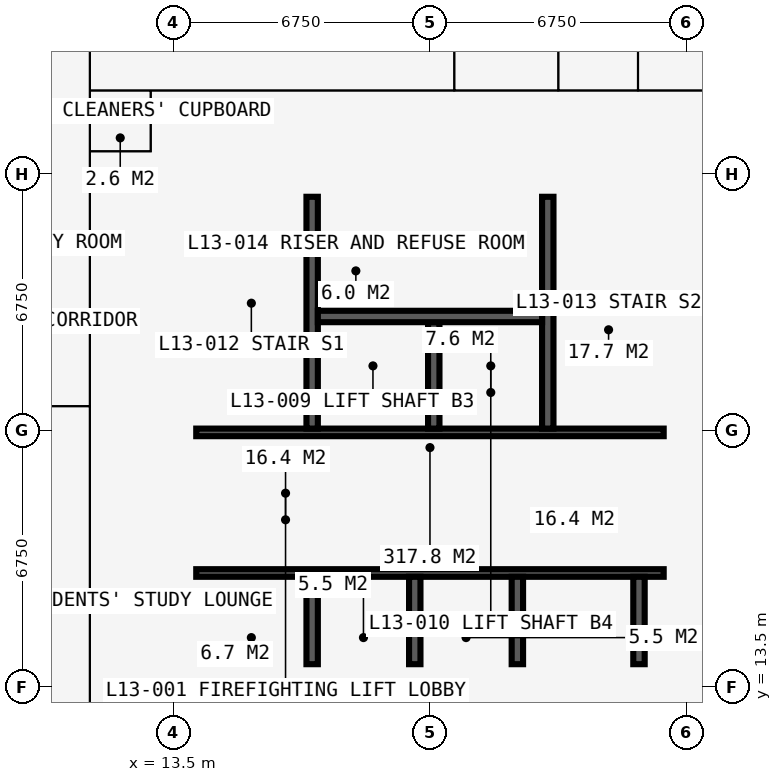
"""IFC4 building model, lengths in metres.
Left out: names, types, materials, properties, quantities, classifications, styles, units other than length and angle.
Written with IfcOpenShell. Run it as: python <this file> out.ifc"""

import sys

from ifc_helpers import new_model, si_unit, direction, frame, frame_2d, origin, place, context, subcontext, project, spatial, rectangle, extrude, element, fill, save


model = new_model("IFC4")
c1 = context("Model", 3, precision=1e-05, world=origin(), true_north=direction((0.0, 1.0)))
c2 = subcontext(c1, "Body", "Model", "MODEL_VIEW")
j1 = project(units=[si_unit("LENGTHUNIT", "METRE"), si_unit("PLANEANGLEUNIT", "RADIAN")], contexts=[c1])
p1 = place(None, origin())
s1 = spatial("IfcSite", under=j1, at=p1, CompositionType="ELEMENT")
p2 = place(p1, origin())
s2 = spatial("IfcBuilding", under=s1, at=p2, CompositionType="ELEMENT")
p3 = place(p2, frame((0.0, 0.0, 50.4)))
s3 = spatial("IfcBuildingStorey", under=s2, at=p3, CompositionType="ELEMENT", Elevation=50.4)
p4 = place(p3, frame((12.9, 13.5, 0.0), z_axis=(0.0, 0.0, 1.0), x_axis=(1.0, 0.0, 0.0)))
e1 = element("IfcWall", 1, at=p4, inside=s3, PredefinedType="SHEAR", context=c2, shape_type="SweptSolid", body=[
    extrude(rectangle(XDim=14.7, YDim=1.2, at=frame_2d((7.35, 0.0))), origin(), (0.0, 0.0, 1.0), 3.6),
])
p5 = place(p3, frame((27.0, 14.1, 0.0), z_axis=(0.0, 0.0, 1.0), x_axis=(0.0, 1.0, 0.0)))
e2 = element("IfcWall", 2, at=p5, inside=s3, PredefinedType="SHEAR", context=c2, shape_type="SweptSolid", body=[
    extrude(rectangle(XDim=12.3, YDim=1.2, at=frame_2d((6.15, 0.0))), origin(), (0.0, 0.0, 1.0), 3.6),
])
p6 = place(p5, frame((3.65, 0.0, 0.0)))
e3 = element("IfcOpeningElement", 3, at=p6, cuts=e2, PredefinedType="OPENING", context=c2, shape_type="SweptSolid", body=[
    extrude(rectangle(XDim=1.2, YDim=2.2, at=frame_2d((0.6, 1.1))), frame((0.0, 0.61, 0.0), z_axis=(0.0, -1.0, 0.0), x_axis=(1.0, 0.0, 0.0)), (0.0, 0.0, 1.0), 1.22),
])
p7 = place(p3, frame((27.6, 27.0, 0.0), z_axis=(0.0, 0.0, 1.0), x_axis=(-1.0, 0.0, 0.0)))
e4 = element("IfcWall", 4, at=p7, inside=s3, PredefinedType="SHEAR", context=c2, shape_type="SweptSolid", body=[
    extrude(rectangle(XDim=14.7, YDim=1.2, at=frame_2d((7.35, 0.0))), origin(), (0.0, 0.0, 1.0), 3.6),
])
p8 = place(p7, frame((5.225, 0.0, 0.0)))
e5 = element("IfcOpeningElement", 5, at=p8, cuts=e4, PredefinedType="OPENING", context=c2, shape_type="SweptSolid", body=[
    extrude(rectangle(XDim=0.9, YDim=2.2, at=frame_2d((0.45, 1.1))), frame((0.0, 0.61, 0.0), z_axis=(0.0, -1.0, 0.0), x_axis=(1.0, 0.0, 0.0)), (0.0, 0.0, 1.0), 1.22),
])
p9 = place(p7, frame((8.2, 0.0, 0.0)))
e6 = element("IfcOpeningElement", 6, at=p9, cuts=e4, PredefinedType="OPENING", context=c2, shape_type="SweptSolid", body=[
    extrude(rectangle(XDim=1.0, YDim=2.2, at=frame_2d((0.5, 1.1))), frame((0.0, 0.61, 0.0), z_axis=(0.0, -1.0, 0.0), x_axis=(1.0, 0.0, 0.0)), (0.0, 0.0, 1.0), 1.22),
])
p10 = place(p3, frame((13.5, 26.4, 0.0), z_axis=(0.0, 0.0, 1.0), x_axis=(0.0, -1.0, 0.0)))
e7 = element("IfcWall", 7, at=p10, inside=s3, PredefinedType="SHEAR", context=c2, shape_type="SweptSolid", body=[
    extrude(rectangle(XDim=12.3, YDim=1.2, at=frame_2d((6.15, 0.0))), origin(), (0.0, 0.0, 1.0), 3.6),
])
p11 = place(p10, frame((7.45, 0.0, 0.0)))
e8 = element("IfcOpeningElement", 8, at=p11, cuts=e7, PredefinedType="OPENING", context=c2, shape_type="SweptSolid", body=[
    extrude(rectangle(XDim=1.2, YDim=2.2, at=frame_2d((0.6, 1.1))), frame((0.0, 0.61, 0.0), z_axis=(0.0, -1.0, 0.0), x_axis=(1.0, 0.0, 0.0)), (0.0, 0.0, 1.0), 1.22),
])
p12 = place(p3, frame((14.1, 16.5, 0.0), z_axis=(0.0, 0.0, 1.0), x_axis=(1.0, 0.0, 0.0)))
e9 = element("IfcWall", 9, at=p12, inside=s3, PredefinedType="SHEAR", context=c2, shape_type="SweptSolid", body=[
    extrude(rectangle(XDim=12.3, YDim=0.2, at=frame_2d((6.15, 0.0))), origin(), (0.0, 0.0, 1.0), 3.6),
])
p13 = place(p12, frame((0.9, 0.0, 0.0)))
e10 = element("IfcOpeningElement", 10, at=p13, cuts=e9, PredefinedType="OPENING", context=c2, shape_type="SweptSolid", body=[
    extrude(rectangle(XDim=1.1, YDim=2.2, at=frame_2d((0.55, 1.1))), frame((0.0, 0.11, 0.0), z_axis=(0.0, -1.0, 0.0), x_axis=(1.0, 0.0, 0.0)), (0.0, 0.0, 1.0), 0.22),
])
p14 = place(p12, frame((9.5, 0.0, 0.0)))
e11 = element("IfcOpeningElement", 11, at=p14, cuts=e9, PredefinedType="OPENING", context=c2, shape_type="SweptSolid", body=[
    extrude(rectangle(XDim=1.1, YDim=2.2, at=frame_2d((0.55, 1.1))), frame((0.0, 0.11, 0.0), z_axis=(0.0, -1.0, 0.0), x_axis=(1.0, 0.0, 0.0)), (0.0, 0.0, 1.0), 0.22),
])
p15 = place(p3, frame((14.1, 20.2, 0.0), z_axis=(0.0, 0.0, 1.0), x_axis=(1.0, 0.0, 0.0)))
e12 = element("IfcWall", 12, at=p15, inside=s3, PredefinedType="SHEAR", context=c2, shape_type="SweptSolid", body=[
    extrude(rectangle(XDim=12.3, YDim=0.2, at=frame_2d((6.15, 0.0))), origin(), (0.0, 0.0, 1.0), 3.6),
])
p16 = place(p15, frame((0.35, 0.0, 0.0)))
e13 = element("IfcOpeningElement", 13, at=p16, cuts=e12, PredefinedType="OPENING", context=c2, shape_type="SweptSolid", body=[
    extrude(rectangle(XDim=1.1, YDim=2.2, at=frame_2d((0.55, 1.1))), frame((0.0, 0.11, 0.0), z_axis=(0.0, -1.0, 0.0), x_axis=(1.0, 0.0, 0.0)), (0.0, 0.0, 1.0), 0.22),
])
p17 = place(p15, frame((9.75, 0.0, 0.0)))
e14 = element("IfcOpeningElement", 14, at=p17, cuts=e12, PredefinedType="OPENING", context=c2, shape_type="SweptSolid", body=[
    extrude(rectangle(XDim=1.1, YDim=2.2, at=frame_2d((0.55, 1.1))), frame((0.0, 0.11, 0.0), z_axis=(0.0, -1.0, 0.0), x_axis=(1.0, 0.0, 0.0)), (0.0, 0.0, 1.0), 0.22),
])
for number, where, z_axis, x_axis in (
    (15, (17.15, 20.3, 0.0), (0.0, 0.0, 1.0), (0.0, 1.0, 0.0)),
    (16, (23.35, 20.3, 0.0), (0.0, 0.0, 1.0), (0.0, 1.0, 0.0)),
):
    element("IfcWall", number, at=place(p3, frame(where, z_axis=z_axis, x_axis=x_axis)), inside=s3, PredefinedType="SHEAR", context=c2, shape_type="SweptSolid", body=[
        extrude(rectangle(XDim=6.1, YDim=0.3, at=frame_2d((3.05, 0.0))), origin(), (0.0, 0.0, 1.0), 3.6),
    ])
p18 = place(p3, frame((20.35, 20.3, 0.0), z_axis=(0.0, 0.0, 1.0), x_axis=(0.0, 1.0, 0.0)))
e17 = element("IfcWall", 17, at=p18, inside=s3, PredefinedType="SHEAR", context=c2, shape_type="SweptSolid", body=[
    extrude(rectangle(XDim=2.8, YDim=0.3, at=frame_2d((1.4, 0.0))), origin(), (0.0, 0.0, 1.0), 3.6),
])
p19 = place(p3, frame((17.3, 23.25, 0.0), z_axis=(0.0, 0.0, 1.0), x_axis=(1.0, 0.0, 0.0)))
e18 = element("IfcWall", 18, at=p19, inside=s3, PredefinedType="SHEAR", context=c2, shape_type="SweptSolid", body=[
    extrude(rectangle(XDim=5.9, YDim=0.3, at=frame_2d((2.95, 0.0))), origin(), (0.0, 0.0, 1.0), 3.6),
])
for number, where, z_axis, x_axis in (
    (19, (17.15, 14.1, 0.0), (0.0, 0.0, 1.0), (0.0, 1.0, 0.0)),
    (20, (19.85, 14.1, 0.0), (0.0, 0.0, 1.0), (0.0, 1.0, 0.0)),
    (21, (22.55, 14.1, 0.0), (0.0, 0.0, 1.0), (0.0, 1.0, 0.0)),
    (22, (25.75, 14.1, 0.0), (0.0, 0.0, 1.0), (0.0, 1.0, 0.0)),
):
    element("IfcWall", number, at=place(p3, frame(where, z_axis=z_axis, x_axis=x_axis)), inside=s3, PredefinedType="SHEAR", context=c2, shape_type="SweptSolid", body=[
        extrude(rectangle(XDim=2.3, YDim=0.3, at=frame_2d((1.15, 0.0))), origin(), (0.0, 0.0, 1.0), 3.6),
    ])
p20 = place(p3, frame((18.875, 16.6, 0.0), z_axis=(0.0, 0.0, 1.0), x_axis=(0.0, 1.0, 0.0)))
e23 = element("IfcWall", 23, at=p20, inside=s3, PredefinedType="PARTITIONING", context=c2, shape_type="SweptSolid", body=[
    extrude(rectangle(XDim=3.5, YDim=0.15, at=frame_2d((1.75, 0.0))), origin(), (0.0, 0.0, 1.0), 3.375),
])
p21 = place(p20, frame((1.15, 0.0, 0.0)))
e24 = element("IfcOpeningElement", 24, at=p21, cuts=e23, PredefinedType="OPENING", context=c2, shape_type="SweptSolid", body=[
    extrude(rectangle(XDim=1.2, YDim=2.2, at=frame_2d((0.6, 1.1))), frame((0.0, 0.085, 0.0), z_axis=(0.0, -1.0, 0.0), x_axis=(1.0, 0.0, 0.0)), (0.0, 0.0, 1.0), 0.17),
])
p22 = place(p3, frame((21.625, 16.6, 0.0), z_axis=(0.0, 0.0, 1.0), x_axis=(0.0, 1.0, 0.0)))
e25 = element("IfcWall", 25, at=p22, inside=s3, PredefinedType="PARTITIONING", context=c2, shape_type="SweptSolid", body=[
    extrude(rectangle(XDim=3.5, YDim=0.15, at=frame_2d((1.75, 0.0))), origin(), (0.0, 0.0, 1.0), 3.375),
])
p23 = place(p22, frame((1.15, 0.0, 0.0)))
e26 = element("IfcOpeningElement", 26, at=p23, cuts=e25, PredefinedType="OPENING", context=c2, shape_type="SweptSolid", body=[
    extrude(rectangle(XDim=1.2, YDim=2.2, at=frame_2d((0.6, 1.1))), frame((0.0, 0.085, 0.0), z_axis=(0.0, -1.0, 0.0), x_axis=(1.0, 0.0, 0.0)), (0.0, 0.0, 1.0), 0.17),
])
p24 = place(p3, frame((20.38, 16.6, 0.0), z_axis=(0.0, 0.0, 1.0), x_axis=(0.0, 1.0, 0.0)))
e27 = element("IfcWall", 27, at=p24, inside=s3, PredefinedType="PARTITIONING", context=c2, shape_type="SweptSolid", body=[
    extrude(rectangle(XDim=3.5, YDim=0.15, at=frame_2d((1.75, 0.0))), origin(), (0.0, 0.0, 1.0), 3.375),
])
p25 = place(p3, frame((19.375, 23.4, 0.0), z_axis=(0.0, 0.0, 1.0), x_axis=(0.0, 1.0, 0.0)))
e28 = element("IfcWall", 28, at=p25, inside=s3, PredefinedType="PARTITIONING", context=c2, shape_type="SweptSolid", body=[
    extrude(rectangle(XDim=3.0, YDim=0.15, at=frame_2d((1.5, 0.0))), origin(), (0.0, 0.0, 1.0), 3.375),
])
for number, where, z_axis, x_axis in (
    (29, (5.65, 20.887, 0.0), (0.0, 0.0, 1.0), (1.0, 0.0, 0.0)),
    (30, (5.65, 22.988, 0.0), (0.0, 0.0, 1.0), (1.0, 0.0, 0.0)),
):
    element("IfcWall", number, at=place(p3, frame(where, z_axis=z_axis, x_axis=x_axis)), inside=s3, PredefinedType="PARTITIONING", context=c2, shape_type="SweptSolid", body=[
        extrude(rectangle(XDim=5.65, YDim=0.15, at=frame_2d((2.825, 0.0))), origin(), (0.0, 0.0, 1.0), 3.375),
    ])
p26 = place(p3, frame((11.3, 11.3, 0.0), z_axis=(0.0, 0.0, 1.0), x_axis=(0.0, 1.0, 0.0)))
e31 = element("IfcWall", 31, at=p26, inside=s3, PredefinedType="PARTITIONING", context=c2, shape_type="SweptSolid", body=[
    extrude(rectangle(XDim=19.075, YDim=0.15, at=frame_2d((9.538, 0.0))), origin(), (0.0, 0.0, 1.0), 3.375),
])
p27 = place(p26, frame((10.137, 0.0, 0.0)))
e32 = element("IfcOpeningElement", 32, at=p27, cuts=e31, PredefinedType="OPENING", context=c2, shape_type="SweptSolid", body=[
    extrude(rectangle(XDim=1.0, YDim=2.2, at=frame_2d((0.5, 1.1))), frame((0.0, 0.085, 0.0), z_axis=(0.0, -1.0, 0.0), x_axis=(1.0, 0.0, 0.0)), (0.0, 0.0, 1.0), 0.17),
])
p28 = place(p3, frame((11.3, 27.6, 0.0), z_axis=(0.0, 0.0, 1.0), x_axis=(1.0, 0.0, 0.0)))
e33 = element("IfcWall", 33, at=p28, inside=s3, PredefinedType="PARTITIONING", context=c2, shape_type="SweptSolid", body=[
    extrude(rectangle(XDim=1.6, YDim=0.15, at=frame_2d((0.8, 0.0))), origin(), (0.0, 0.0, 1.0), 2.877),
])
p29 = place(p28, frame((0.3, 0.0, 0.0)))
e34 = element("IfcOpeningElement", 34, at=p29, cuts=e33, PredefinedType="OPENING", context=c2, shape_type="SweptSolid", body=[
    extrude(rectangle(XDim=0.95, YDim=2.2, at=frame_2d((0.475, 1.1))), frame((0.0, 0.085, 0.0), z_axis=(0.0, -1.0, 0.0), x_axis=(1.0, 0.0, 0.0)), (0.0, 0.0, 1.0), 0.17),
])
p30 = place(p3, frame((11.3, 29.2, 0.0), z_axis=(0.0, 0.0, 1.0), x_axis=(1.0, 0.0, 0.0)))
e35 = element("IfcWall", 35, at=p30, inside=s3, PredefinedType="PARTITIONING", context=c2, shape_type="SweptSolid", body=[
    extrude(rectangle(XDim=19.075, YDim=0.15, at=frame_2d((9.538, 0.0))), origin(), (0.0, 0.0, 1.0), 3.375),
])
p31 = place(p30, frame((12.875, 0.0, 0.0)))
e36 = element("IfcOpeningElement", 36, at=p31, cuts=e35, PredefinedType="OPENING", context=c2, shape_type="SweptSolid", body=[
    extrude(rectangle(XDim=1.0, YDim=2.2, at=frame_2d((0.5, 1.1))), frame((0.0, 0.085, 0.0), z_axis=(0.0, -1.0, 0.0), x_axis=(1.0, 0.0, 0.0)), (0.0, 0.0, 1.0), 0.17),
])
p32 = place(p30, frame((10.438, 0.0, 0.0)))
e37 = element("IfcOpeningElement", 37, at=p32, cuts=e35, PredefinedType="OPENING", context=c2, shape_type="SweptSolid", body=[
    extrude(rectangle(XDim=1.0, YDim=2.2, at=frame_2d((0.5, 1.1))), frame((0.0, 0.085, 0.0), z_axis=(0.0, -1.0, 0.0), x_axis=(1.0, 0.0, 0.0)), (0.0, 0.0, 1.0), 0.17),
])
p33 = place(p30, frame((15.675, 0.0, 0.0)))
e38 = element("IfcOpeningElement", 38, at=p33, cuts=e35, PredefinedType="OPENING", context=c2, shape_type="SweptSolid", body=[
    extrude(rectangle(XDim=0.95, YDim=2.2, at=frame_2d((0.475, 1.1))), frame((0.0, 0.085, 0.0), z_axis=(0.0, -1.0, 0.0), x_axis=(1.0, 0.0, 0.0)), (0.0, 0.0, 1.0), 0.17),
])
p34 = place(p3, frame((12.9, 27.6, 0.0), z_axis=(0.0, 0.0, 1.0), x_axis=(0.0, 1.0, 0.0)))
e39 = element("IfcWall", 39, at=p34, inside=s3, PredefinedType="PARTITIONING", context=c2, shape_type="SweptSolid", body=[
    extrude(rectangle(XDim=1.6, YDim=0.15, at=frame_2d((0.8, 0.0))), origin(), (0.0, 0.0, 1.0), 3.375),
])
p35 = place(p3, frame((20.887, 29.2, 0.0), z_axis=(0.0, 0.0, 1.0), x_axis=(0.0, 1.0, 0.0)))
e40 = element("IfcWall", 40, at=p35, inside=s3, PredefinedType="PARTITIONING", context=c2, shape_type="SweptSolid", body=[
    extrude(rectangle(XDim=5.65, YDim=0.15, at=frame_2d((2.825, 0.0))), origin(), (0.0, 0.0, 1.0), 3.375),
])
p36 = place(p3, frame((23.625, 29.2, 0.0), z_axis=(0.0, 0.0, 1.0), x_axis=(0.0, 1.0, 0.0)))
e41 = element("IfcWall", 41, at=p36, inside=s3, PredefinedType="PARTITIONING", context=c2, shape_type="SweptSolid", body=[
    extrude(rectangle(XDim=12.034, YDim=0.15, at=frame_2d((6.017, 0.0))), origin(), (0.0, 0.0, 1.0), 3.375),
])
p37 = place(p3, frame((25.725, 29.2, 0.0), z_axis=(0.0, 0.0, 1.0), x_axis=(0.0, 1.0, 0.0)))
e42 = element("IfcWall", 42, at=p37, inside=s3, PredefinedType="PARTITIONING", context=c2, shape_type="SweptSolid", body=[
    extrude(rectangle(XDim=5.65, YDim=0.15, at=frame_2d((2.825, 0.0))), origin(), (0.0, 0.0, 1.0), 3.375),
])
p38 = place(p13, origin())
e43 = element("IfcDoor", 43, at=p38, inside=s3, OperationType="DOUBLE_DOOR_SLIDING", PredefinedType="DOOR", context=c2, shape_type="SweptSolid", body=[
    extrude(rectangle(XDim=1.1, YDim=2.2, at=frame_2d((0.55, 1.1))), frame((0.0, 0.025, 0.0), z_axis=(0.0, -1.0, 0.0), x_axis=(1.0, 0.0, 0.0)), (0.0, 0.0, 1.0), 0.05),
])
fill(e10, e43)
p39 = place(p14, origin())
e44 = element("IfcDoor", 44, at=p39, inside=s3, OperationType="DOUBLE_DOOR_SLIDING", PredefinedType="DOOR", context=c2, shape_type="SweptSolid", body=[
    extrude(rectangle(XDim=1.1, YDim=2.2, at=frame_2d((0.55, 1.1))), frame((0.0, 0.025, 0.0), z_axis=(0.0, -1.0, 0.0), x_axis=(1.0, 0.0, 0.0)), (0.0, 0.0, 1.0), 0.05),
])
fill(e11, e44)
p40 = place(p11, origin())
e45 = element("IfcDoor", 45, at=p40, inside=s3, OperationType="DOUBLE_DOOR_SINGLE_SWING", PredefinedType="DOOR", context=c2, shape_type="SweptSolid", body=[
    extrude(rectangle(XDim=1.2, YDim=2.2, at=frame_2d((0.6, 1.1))), frame((0.0, 0.025, 0.0), z_axis=(0.0, -1.0, 0.0), x_axis=(1.0, 0.0, 0.0)), (0.0, 0.0, 1.0), 0.05),
])
fill(e8, e45)
p41 = place(p6, origin())
e46 = element("IfcDoor", 46, at=p41, inside=s3, OperationType="DOUBLE_DOOR_SINGLE_SWING", PredefinedType="DOOR", context=c2, shape_type="SweptSolid", body=[
    extrude(rectangle(XDim=1.2, YDim=2.2, at=frame_2d((0.6, 1.1))), frame((0.0, 0.025, 0.0), z_axis=(0.0, -1.0, 0.0), x_axis=(1.0, 0.0, 0.0)), (0.0, 0.0, 1.0), 0.05),
])
fill(e3, e46)
p42 = place(p21, origin())
e47 = element("IfcDoor", 47, at=p42, inside=s3, OperationType="DOUBLE_DOOR_SINGLE_SWING", PredefinedType="DOOR", context=c2, shape_type="SweptSolid", body=[
    extrude(rectangle(XDim=1.2, YDim=2.2, at=frame_2d((0.6, 1.1))), frame((0.0, 0.025, 0.0), z_axis=(0.0, -1.0, 0.0), x_axis=(1.0, 0.0, 0.0)), (0.0, 0.0, 1.0), 0.05),
])
fill(e24, e47)
p43 = place(p23, origin())
e48 = element("IfcDoor", 48, at=p43, inside=s3, OperationType="DOUBLE_DOOR_SINGLE_SWING", PredefinedType="DOOR", context=c2, shape_type="SweptSolid", body=[
    extrude(rectangle(XDim=1.2, YDim=2.2, at=frame_2d((0.6, 1.1))), frame((0.0, 0.025, 0.0), z_axis=(0.0, -1.0, 0.0), x_axis=(1.0, 0.0, 0.0)), (0.0, 0.0, 1.0), 0.05),
])
fill(e26, e48)
p44 = place(p8, origin())
e49 = element("IfcDoor", 49, at=p44, inside=s3, OperationType="SINGLE_SWING_LEFT", PredefinedType="DOOR", context=c2, shape_type="SweptSolid", body=[
    extrude(rectangle(XDim=0.9, YDim=2.2, at=frame_2d((0.45, 1.1))), frame((0.0, 0.4, 0.0), z_axis=(0.0, -1.0, 0.0), x_axis=(1.0, 0.0, 0.0)), (0.0, 0.0, 1.0), 0.8),
])
fill(e5, e49)
p45 = place(p9, origin())
e50 = element("IfcDoor", 50, at=p45, inside=s3, OperationType="SINGLE_SWING_LEFT", PredefinedType="DOOR", context=c2, shape_type="SweptSolid", body=[
    extrude(rectangle(XDim=1.0, YDim=2.2, at=frame_2d((0.5, 1.1))), frame((0.0, 0.025, 0.0), z_axis=(0.0, -1.0, 0.0), x_axis=(1.0, 0.0, 0.0)), (0.0, 0.0, 1.0), 0.05),
])
fill(e6, e50)
p46 = place(p16, origin())
e51 = element("IfcDoor", 51, at=p46, inside=s3, OperationType="SINGLE_SWING_LEFT", PredefinedType="DOOR", context=c2, shape_type="SweptSolid", body=[
    extrude(rectangle(XDim=1.1, YDim=2.2, at=frame_2d((0.55, 1.1))), frame((0.0, 0.025, 0.0), z_axis=(0.0, -1.0, 0.0), x_axis=(1.0, 0.0, 0.0)), (0.0, 0.0, 1.0), 0.05),
])
fill(e13, e51)
p47 = place(p17, origin())
e52 = element("IfcDoor", 52, at=p47, inside=s3, OperationType="SINGLE_SWING_LEFT", PredefinedType="DOOR", context=c2, shape_type="SweptSolid", body=[
    extrude(rectangle(XDim=1.1, YDim=2.2, at=frame_2d((0.55, 1.1))), frame((0.0, 0.025, 0.0), z_axis=(0.0, -1.0, 0.0), x_axis=(1.0, 0.0, 0.0)), (0.0, 0.0, 1.0), 0.05),
])
fill(e14, e52)
p48 = place(p29, origin())
e53 = element("IfcDoor", 53, at=p48, inside=s3, OperationType="SINGLE_SWING_LEFT", PredefinedType="DOOR", context=c2, shape_type="SweptSolid", body=[
    extrude(rectangle(XDim=0.95, YDim=2.2, at=frame_2d((0.475, 1.1))), frame((0.0, 0.025, 0.0), z_axis=(0.0, -1.0, 0.0), x_axis=(1.0, 0.0, 0.0)), (0.0, 0.0, 1.0), 0.05),
])
fill(e34, e53)
p49 = place(p31, origin())
e54 = element("IfcDoor", 54, at=p49, inside=s3, OperationType="SINGLE_SWING_LEFT", PredefinedType="DOOR", context=c2, shape_type="SweptSolid", body=[
    extrude(rectangle(XDim=1.0, YDim=2.2, at=frame_2d((0.5, 1.1))), frame((0.0, 0.025, 0.0), z_axis=(0.0, -1.0, 0.0), x_axis=(1.0, 0.0, 0.0)), (0.0, 0.0, 1.0), 0.05),
])
fill(e36, e54)
p50 = place(p32, origin())
e55 = element("IfcDoor", 55, at=p50, inside=s3, OperationType="SINGLE_SWING_LEFT", PredefinedType="DOOR", context=c2, shape_type="SweptSolid", body=[
    extrude(rectangle(XDim=1.0, YDim=2.2, at=frame_2d((0.5, 1.1))), frame((0.0, 0.025, 0.0), z_axis=(0.0, -1.0, 0.0), x_axis=(1.0, 0.0, 0.0)), (0.0, 0.0, 1.0), 0.05),
])
fill(e37, e55)
p51 = place(p33, origin())
e56 = element("IfcDoor", 56, at=p51, inside=s3, OperationType="SINGLE_SWING_LEFT", PredefinedType="DOOR", context=c2, shape_type="SweptSolid", body=[
    extrude(rectangle(XDim=0.95, YDim=2.2, at=frame_2d((0.475, 1.1))), frame((0.0, 0.025, 0.0), z_axis=(0.0, -1.0, 0.0), x_axis=(1.0, 0.0, 0.0)), (0.0, 0.0, 1.0), 0.05),
])
fill(e38, e56)
p52 = place(p27, origin())
e57 = element("IfcDoor", 57, at=p52, inside=s3, OperationType="SINGLE_SWING_LEFT", PredefinedType="DOOR", context=c2, shape_type="SweptSolid", body=[
    extrude(rectangle(XDim=1.0, YDim=2.2, at=frame_2d((0.5, 1.1))), frame((0.0, 0.025, 0.0), z_axis=(0.0, -1.0, 0.0), x_axis=(1.0, 0.0, 0.0)), (0.0, 0.0, 1.0), 0.05),
])
fill(e32, e57)
save(model, sys.argv[1])
